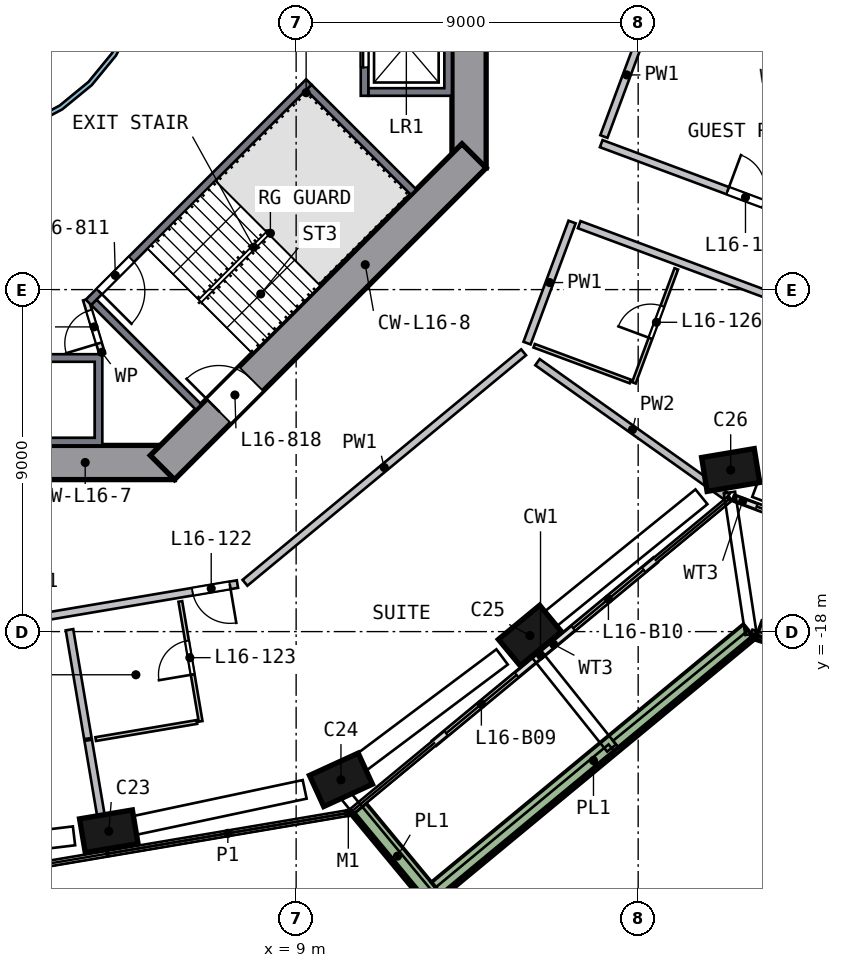
"""IFC4 building model, lengths in metres.
Left out: names, types, materials, properties, quantities, classifications, styles, units other than length and angle.
Written with IfcOpenShell. Run it as: python <this file> out.ifc"""

import sys

from ifc_helpers import new_model, si_unit, direction, frame, frame_2d, origin, origin_2d, place, context, subcontext, project, spatial, polyline, rectangle, outline, extrude, element, fill, save


model = new_model("IFC4")
c1 = context("Model", 3, precision=1e-05, world=origin(), true_north=direction((0.0, 1.0)))
c2 = subcontext(c1, "Body", "Model", "MODEL_VIEW")
j1 = project(units=[si_unit("LENGTHUNIT", "METRE"), si_unit("PLANEANGLEUNIT", "RADIAN")], contexts=[c1])
p1 = place(None, origin())
s1 = spatial("IfcSite", under=j1, at=p1, CompositionType="ELEMENT")
p2 = place(p1, origin())
s2 = spatial("IfcBuilding", under=s1, at=p2, CompositionType="ELEMENT")
p3 = place(p2, frame((0.0, 0.0, 71.5)))
s3 = spatial("IfcBuildingStorey", under=s2, at=p3, CompositionType="ELEMENT", Elevation=71.5)
p4 = place(p3, frame((3.937, -23.278, 0.0), z_axis=(0.110623387, 0.019569342, 0.993669717), x_axis=(0.979911476, 0.164784415, -0.112336973)))
e1 = element("IfcColumn", 1, at=p4, inside=s3, PredefinedType="COLUMN", context=c2, shape_type="SweptSolid", body=[
    extrude(rectangle(XDim=1.4, YDim=0.9, at=origin_2d()), origin(), (0.0, 0.0, 1.0), 3.019),
])
p5 = place(p3, frame((10.054, -21.959, 0.0), z_axis=(0.104043119, 0.048666634, 0.993381391), x_axis=(-0.903351173, -0.413236233, 0.114858494)))
e2 = element("IfcColumn", 2, at=p5, inside=s3, PredefinedType="COLUMN", context=c2, shape_type="SweptSolid", body=[
    extrude(rectangle(XDim=1.4, YDim=0.9, at=origin_2d()), origin(), (0.0, 0.0, 1.0), 3.02),
])
p6 = place(p3, frame((15.049, -18.19, 0.0), z_axis=(0.085879498, 0.072294041, 0.993679165), x_axis=(0.765590624, 0.633458898, -0.112253377)))
e3 = element("IfcColumn", 3, at=p6, inside=s3, PredefinedType="COLUMN", context=c2, shape_type="SweptSolid", body=[
    extrude(rectangle(XDim=1.4, YDim=0.9, at=origin_2d()), origin(), (0.0, 0.0, 1.0), 3.019),
])
p7 = place(p3, frame((20.356, -13.865, 0.0), z_axis=(0.065060711, 0.097308193, 0.99312548), x_axis=(-0.983911636, -0.159691124, 0.080103921)))
e4 = element("IfcColumn", 4, at=p7, inside=s3, PredefinedType="COLUMN", context=c2, shape_type="SweptSolid", body=[
    extrude(rectangle(XDim=1.4, YDim=0.9, at=origin_2d()), origin(), (0.0, 0.0, 1.0), 3.021),
])
p8 = place(p3, frame((13.55, -5.799, 0.0), z_axis=(0.0, 0.0, 1.0), x_axis=(0.0, 1.0, 0.0)))
e5 = element("IfcWall", 5, at=p8, inside=s3, PredefinedType="SHEAR", context=c2, shape_type="SweptSolid", body=[
    extrude(rectangle(XDim=11.598, YDim=0.9, at=frame_2d((5.799, 0.0))), origin(), (0.0, 0.0, 1.0), 3.5),
])
p9 = place(p8, frame((4.899, 0.0, 0.0)))
e6 = element("IfcOpeningElement", 6, at=p9, cuts=e5, PredefinedType="OPENING", context=c2, shape_type="SweptSolid", body=[
    extrude(rectangle(XDim=1.8, YDim=2.1, at=frame_2d((0.9, 1.05))), frame((0.0, 0.46, 0.0), z_axis=(0.0, -1.0, 0.0), x_axis=(1.0, 0.0, 0.0)), (0.0, 0.0, 1.0), 0.92),
])
p10 = place(p3, frame((-5.799, -13.55, 0.0), z_axis=(0.0, 0.0, 1.0), x_axis=(1.0, 0.0, 0.0)))
e7 = element("IfcWall", 7, at=p10, inside=s3, PredefinedType="SHEAR", context=c2, shape_type="SweptSolid", body=[
    extrude(rectangle(XDim=11.598, YDim=0.9, at=frame_2d((5.799, 0.0))), origin(), (0.0, 0.0, 1.0), 3.5),
])
p11 = place(p10, frame((4.899, 0.0, 0.0)))
e8 = element("IfcOpeningElement", 8, at=p11, cuts=e7, PredefinedType="OPENING", context=c2, shape_type="SweptSolid", body=[
    extrude(rectangle(XDim=1.8, YDim=2.1, at=frame_2d((0.9, 1.05))), frame((0.0, 0.46, 0.0), z_axis=(0.0, -1.0, 0.0), x_axis=(1.0, 0.0, 0.0)), (0.0, 0.0, 1.0), 0.92),
])
p12 = place(p3, frame((5.481, -13.682, 0.0), z_axis=(0.0, 0.0, 1.0), x_axis=(0.707106781, 0.707106781, 0.0)))
e9 = element("IfcWall", 9, at=p12, inside=s3, PredefinedType="SHEAR", context=c2, shape_type="SweptSolid", body=[
    extrude(rectangle(XDim=11.598, YDim=0.9, at=frame_2d((5.799, 0.0))), origin(), (0.0, 0.0, 1.0), 3.5),
])
p13 = place(p12, frame((2.099, 0.0, 0.0)))
e10 = element("IfcOpeningElement", 10, at=p13, cuts=e9, PredefinedType="OPENING", context=c2, shape_type="SweptSolid", body=[
    extrude(rectangle(XDim=1.2, YDim=2.1, at=frame_2d((0.6, 1.05))), frame((0.0, 0.46, 0.0), z_axis=(0.0, -1.0, 0.0), x_axis=(1.0, 0.0, 0.0)), (0.0, 0.0, 1.0), 0.92),
])
p14 = place(p3, frame((12.641, -20.928, 0.0), z_axis=(0.0, 0.0, 1.0), x_axis=(0.770528692, 0.637405314, 0.0)))
e11 = element("IfcWall", 11, at=p14, inside=s3, PredefinedType="SOLIDWALL", context=c2, shape_type="SweptSolid", body=[
    extrude(rectangle(XDim=3.6, YDim=0.15, at=frame_2d((1.8, 0.0))), origin(), (0.0, 0.0, 1.0), 2.935),
])
p15 = place(p14, frame((0.4, 0.0, 0.0)))
e12 = element("IfcOpeningElement", 12, at=p15, cuts=e11, PredefinedType="OPENING", context=c2, shape_type="SweptSolid", body=[
    extrude(rectangle(XDim=2.4, YDim=2.4, at=frame_2d((1.2, 1.2))), frame((0.0, 0.085, 0.0), z_axis=(0.0, -1.0, 0.0), x_axis=(1.0, 0.0, 0.0)), (0.0, 0.0, 1.0), 0.17),
])
p16 = place(p3, frame((15.415, -18.634, 0.0), z_axis=(0.0, 0.0, 1.0), x_axis=(0.770532872, 0.637400262, 0.0)))
e13 = element("IfcWall", 13, at=p16, inside=s3, PredefinedType="SOLIDWALL", context=c2, shape_type="SweptSolid", body=[
    extrude(rectangle(XDim=3.939, YDim=0.15, at=frame_2d((1.969, 0.0))), origin(), (0.0, 0.0, 1.0), 2.935),
])
p17 = place(p16, frame((1.139, 0.0, 0.0)))
e14 = element("IfcOpeningElement", 14, at=p17, cuts=e13, PredefinedType="OPENING", context=c2, shape_type="SweptSolid", body=[
    extrude(rectangle(XDim=2.4, YDim=2.4, at=frame_2d((1.2, 1.2))), frame((0.0, 0.085, 0.0), z_axis=(0.0, -1.0, 0.0), x_axis=(1.0, 0.0, 0.0)), (0.0, 0.0, 1.0), 0.17),
])
p18 = place(p3, frame((20.563, -14.502, 0.0), z_axis=(0.0, 0.0, 1.0), x_axis=(0.937270154, -0.348603871, 0.0)))
e15 = element("IfcWall", 15, at=p18, inside=s3, PredefinedType="SOLIDWALL", context=c2, shape_type="SweptSolid", body=[
    extrude(rectangle(XDim=2.497, YDim=0.15, at=frame_2d((1.249, 0.0))), origin(), (0.0, 0.0, 1.0), 2.935),
])
p19 = place(p18, frame((0.597, 0.0, 0.0)))
e16 = element("IfcOpeningElement", 16, at=p19, cuts=e15, PredefinedType="OPENING", context=c2, shape_type="SweptSolid", body=[
    extrude(rectangle(XDim=1.5, YDim=2.4, at=frame_2d((0.75, 1.2))), frame((0.0, 0.085, 0.0), z_axis=(0.0, -1.0, 0.0), x_axis=(1.0, 0.0, 0.0)), (0.0, 0.0, 1.0), 0.17),
])
p20 = place(p3, frame((10.648, -22.676, 0.0), z_axis=(0.0, 0.0, 1.0), x_axis=(0.637463064, -0.770480916, 0.0)))
e17 = element("IfcWall", 17, at=p20, inside=s3, PredefinedType="SOLIDWALL", context=c2, shape_type="SweptSolid", body=[
    extrude(rectangle(XDim=3.199, YDim=0.5, at=frame_2d((1.6, 0.0))), origin(), (0.0, 0.0, 1.0), 0.7),
])
p21 = place(p3, frame((12.72, -24.789, 0.0), z_axis=(0.0, 0.0, 1.0), x_axis=(0.770513868, 0.637423234, 0.0)))
e18 = element("IfcWall", 18, at=p21, inside=s3, PredefinedType="SOLIDWALL", context=c2, shape_type="SweptSolid", body=[
    extrude(rectangle(XDim=10.652, YDim=0.5, at=frame_2d((5.326, 0.0))), origin(), (0.0, 0.0, 1.0), 0.7),
])
p22 = place(p3, frame((21.175, -17.957, 0.0), z_axis=(0.0, 0.0, 1.0), x_axis=(0.937276934, -0.348585642, 0.0)))
e19 = element("IfcWall", 19, at=p22, inside=s3, PredefinedType="SOLIDWALL", context=c2, shape_type="SweptSolid", body=[
    extrude(rectangle(XDim=6.972, YDim=0.5, at=frame_2d((3.486, 0.0))), origin(), (0.0, 0.0, 1.0), 0.7),
])
p23 = place(p3, origin())
e20 = element("IfcWall", 20, at=p23, inside=s3, PredefinedType="SOLIDWALL", context=c2, shape_type="SweptSolid", body=[
    extrude(outline(polyline([(13.1, -3.9), (10.9, -3.9), (10.9, -3.7), (12.9, -3.7), (12.9, -1.4), (10.9, -1.4), (10.9, -1.2), (13.1, -1.2), (13.1, -3.9)])), origin(), (0.0, 0.0, 1.0), 3.0),
])
p24 = place(p3, frame((10.8, -1.2, 0.0), z_axis=(0.0, 0.0, 1.0), x_axis=(0.0, -1.0, 0.0)))
e21 = element("IfcWall", 21, at=p24, inside=s3, PredefinedType="SOLIDWALL", context=c2, shape_type="SweptSolid", body=[
    extrude(rectangle(XDim=2.7, YDim=0.2, at=frame_2d((1.35, 0.0))), origin(), (0.0, 0.0, 1.0), 3.0),
])
p25 = place(p24, frame((0.75, 0.0, 0.0)))
e22 = element("IfcOpeningElement", 22, at=p25, cuts=e21, PredefinedType="OPENING", context=c2, shape_type="SweptSolid", body=[
    extrude(rectangle(XDim=1.2, YDim=2.1, at=frame_2d((0.6, 1.05))), frame((0.0, 0.11, 0.0), z_axis=(0.0, -1.0, 0.0), x_axis=(1.0, 0.0, 0.0)), (0.0, 0.0, 1.0), 0.22),
])
p26 = place(p3, origin())
e23 = element("IfcWall", 23, at=p26, inside=s3, PredefinedType="SOLIDWALL", context=c2, shape_type="SweptSolid", body=[
    extrude(outline(polyline([(3.9, -10.7), (3.9, -13.1), (1.2, -13.1), (1.2, -10.7), (3.9, -10.7)]), holes=[polyline([(1.4, -12.9), (3.7, -12.9), (3.7, -10.9), (1.4, -10.9), (1.4, -12.9)])]), origin(), (0.0, 0.0, 1.0), 3.0),
])
p27 = place(p3, frame((9.334, -3.535, 0.0), z_axis=(0.0, 0.0, 1.0), x_axis=(-0.707106781, -0.707106781, 0.0)))
e24 = element("IfcWall", 24, at=p27, inside=s3, PredefinedType="SOLIDWALL", context=c2, shape_type="SweptSolid", body=[
    extrude(rectangle(XDim=8.2, YDim=0.2, at=frame_2d((4.1, 0.0))), origin(), (0.0, 0.0, 1.0), 3.0),
])
p28 = place(p27, frame((6.6, 0.0, 0.0)))
e25 = element("IfcOpeningElement", 25, at=p28, cuts=e24, PredefinedType="OPENING", context=c2, shape_type="SweptSolid", body=[
    extrude(rectangle(XDim=1.2, YDim=2.1, at=frame_2d((0.6, 1.05))), frame((0.0, 0.11, 0.0), z_axis=(0.0, -1.0, 0.0), x_axis=(1.0, 0.0, 0.0)), (0.0, 0.0, 1.0), 0.22),
])
for number, where, z_axis, x_axis in (
    (26, (3.677, -9.334, 0.0), (0.0, 0.0, 1.0), (0.707, -0.707, 0.0)),
    (27, (9.334, -3.677, 0.0), (0.0, 0.0, 1.0), (0.707, -0.707, 0.0)),
):
    element("IfcWall", number, at=place(p3, frame(where, z_axis=z_axis, x_axis=x_axis)), inside=s3, PredefinedType="SOLIDWALL", context=c2, shape_type="SweptSolid", body=[
        extrude(rectangle(XDim=3.9, YDim=0.2, at=frame_2d((1.95, 0.0))), origin(), (0.0, 0.0, 1.0), 3.0),
    ])
p29 = place(p3, frame((3.9, -10.7, 0.0), z_axis=(0.0, 0.0, 1.0), x_axis=(-0.289808785, 0.957084567, 0.0)))
e28 = element("IfcWall", 28, at=p29, inside=s3, PredefinedType="PARTITIONING", context=c2, shape_type="SweptSolid", body=[
    extrude(rectangle(XDim=1.501, YDim=0.15, at=frame_2d((0.75, 0.0))), origin(), (0.0, 0.0, 1.0), 3.0),
])
p30 = place(p29, frame((0.301, 0.0, 0.0)))
e29 = element("IfcOpeningElement", 29, at=p30, cuts=e28, PredefinedType="OPENING", context=c2, shape_type="SweptSolid", body=[
    extrude(rectangle(XDim=0.9, YDim=2.1, at=frame_2d((0.45, 1.05))), frame((0.0, 0.085, 0.0), z_axis=(0.0, -1.0, 0.0), x_axis=(1.0, 0.0, 0.0)), (0.0, 0.0, 1.0), 0.17),
])
p31 = place(p3, origin())
e30 = element("IfcWall", 30, at=p31, inside=s3, PredefinedType="SOLIDWALL", context=c2, shape_type="SweptSolid", body=[
    extrude(outline(polyline([(5.021, -0.999), (4.73, -1.959), (4.257, -2.844), (3.62, -3.62), (2.844, -4.257), (1.959, -4.73), (0.999, -5.021), (0.0, -5.12), (-0.999, -5.021), (-1.959, -4.73), (-2.844, -4.257), (-3.62, -3.62), (-4.257, -2.844), (-4.73, -1.959), (-5.021, -0.999), (-5.12, 0.0), (-5.021, 0.999), (-4.73, 1.959), (-4.257, 2.844), (-3.62, 3.62), (-2.844, 4.257), (-1.959, 4.73), (-0.999, 5.021), (0.0, 5.12), (0.999, 5.021), (1.959, 4.73), (2.844, 4.257), (3.62, 3.62), (4.257, 2.844), (4.73, 1.959), (5.021, 0.999), (5.12, 0.0), (5.021, -0.999)]), holes=[polyline([(4.904, 0.976), (4.619, 1.913), (4.157, 2.778), (3.535, 3.535), (2.778, 4.157), (1.913, 4.619), (0.976, 4.904), (0.0, 5.0), (-0.976, 4.904), (-1.913, 4.619), (-2.778, 4.157), (-3.535, 3.535), (-4.157, 2.778), (-4.619, 1.913), (-4.904, 0.976), (-5.0, 0.0), (-4.904, -0.976), (-4.619, -1.913), (-4.157, -2.778), (-3.535, -3.535), (-2.778, -4.157), (-1.913, -4.619), (-0.976, -4.904), (0.0, -5.0), (0.976, -4.904), (1.913, -4.619), (2.778, -4.157), (3.535, -3.535), (4.157, -2.778), (4.619, -1.913), (4.904, -0.976), (5.0, 0.0), (4.904, 0.976)])]), origin(), (0.0, 0.0, 1.0), 3.0),
])
p32 = place(p3, frame((7.456, -16.75, 0.0), z_axis=(0.0, 0.0, 1.0), x_axis=(-0.985995117, -0.166774184, 0.0)))
e31 = element("IfcWall", 31, at=p32, inside=s3, PredefinedType="SOLIDWALL", context=c2, shape_type="SweptSolid", body=[
    extrude(rectangle(XDim=9.116, YDim=0.2, at=frame_2d((4.558, 0.0))), origin(), (0.0, 0.0, 1.0), 3.0),
])
p33 = place(p32, frame((0.2, 0.0, 0.0)))
e32 = element("IfcOpeningElement", 32, at=p33, cuts=e31, PredefinedType="OPENING", context=c2, shape_type="SweptSolid", body=[
    extrude(rectangle(XDim=1.0, YDim=2.1, at=frame_2d((0.5, 1.05))), frame((0.0, 0.11, 0.0), z_axis=(0.0, -1.0, 0.0), x_axis=(1.0, 0.0, 0.0)), (0.0, 0.0, 1.0), 0.22),
])
p34 = place(p3, frame((7.654, -16.716, 0.0), z_axis=(0.0, 0.0, 1.0), x_axis=(0.770506418, 0.63743224, 0.0)))
e33 = element("IfcWall", 33, at=p34, inside=s3, PredefinedType="SOLIDWALL", context=c2, shape_type="SweptSolid", body=[
    extrude(rectangle(XDim=9.516, YDim=0.2, at=frame_2d((4.758, 0.0))), origin(), (0.0, 0.0, 1.0), 3.0),
])
p35 = place(p3, frame((15.076, -10.408, 0.0), z_axis=(0.0, 0.0, 1.0), x_axis=(0.348572345, 0.937281879, 0.0)))
e34 = element("IfcWall", 34, at=p35, inside=s3, PredefinedType="SOLIDWALL", context=c2, shape_type="SweptSolid", body=[
    extrude(rectangle(XDim=3.4, YDim=0.2, at=frame_2d((1.7, 0.0))), origin(), (0.0, 0.0, 1.0), 3.0),
])
p36 = place(p3, frame((17.098, -4.972, 0.0), z_axis=(0.0, 0.0, 1.0), x_axis=(0.348592386, 0.937274425, 0.0)))
e35 = element("IfcWall", 35, at=p36, inside=s3, PredefinedType="SOLIDWALL", context=c2, shape_type="SweptSolid", body=[
    extrude(rectangle(XDim=3.458, YDim=0.2, at=frame_2d((1.729, 0.0))), origin(), (0.0, 0.0, 1.0), 3.0),
])
p37 = place(p3, frame((30.62, -12.561, 0.0), z_axis=(0.0, 0.0, 1.0), x_axis=(-0.937284552, 0.348565156, 0.0)))
e36 = element("IfcWall", 36, at=p37, inside=s3, PredefinedType="SOLIDWALL", context=c2, shape_type="SweptSolid", body=[
    extrude(rectangle(XDim=15.12, YDim=0.2, at=frame_2d((7.56, 0.0))), origin(), (0.0, 0.0, 1.0), 3.0),
])
p38 = place(p37, frame((1.7, 0.0, 0.0)))
e37 = element("IfcOpeningElement", 37, at=p38, cuts=e36, PredefinedType="OPENING", context=c2, shape_type="SweptSolid", body=[
    extrude(rectangle(XDim=1.0, YDim=2.1, at=frame_2d((0.5, 1.05))), frame((0.0, 0.11, 0.0), z_axis=(0.0, -1.0, 0.0), x_axis=(1.0, 0.0, 0.0)), (0.0, 0.0, 1.0), 0.22),
])
p39 = place(p3, frame((17.028, -5.159, 0.0), z_axis=(0.0, 0.0, 1.0), x_axis=(0.937277315, -0.348584617, 0.0)))
e38 = element("IfcWall", 38, at=p39, inside=s3, PredefinedType="SOLIDWALL", context=c2, shape_type="SweptSolid", body=[
    extrude(rectangle(XDim=15.12, YDim=0.2, at=frame_2d((7.56, 0.0))), origin(), (0.0, 0.0, 1.0), 3.0),
])
p40 = place(p39, frame((3.55, 0.0, 0.0)))
e39 = element("IfcOpeningElement", 39, at=p40, cuts=e38, PredefinedType="OPENING", context=c2, shape_type="SweptSolid", body=[
    extrude(rectangle(XDim=1.0, YDim=2.1, at=frame_2d((0.5, 1.05))), frame((0.0, 0.11, 0.0), z_axis=(0.0, -1.0, 0.0), x_axis=(1.0, 0.0, 0.0)), (0.0, 0.0, 1.0), 0.22),
])
p41 = place(p3, frame((3.036, -17.951, 0.0), z_axis=(0.0, 0.0, 1.0), x_axis=(0.166756479, -0.985998112, 0.0)))
e40 = element("IfcWall", 40, at=p41, inside=s3, PredefinedType="SOLIDWALL", context=c2, shape_type="SweptSolid", body=[
    extrude(rectangle(XDim=2.905, YDim=0.2, at=frame_2d((1.452, 0.0))), origin(), (0.0, 0.0, 1.0), 3.0),
])
p42 = place(p3, frame((3.528, -20.86, 0.0), z_axis=(0.0, 0.0, 1.0), x_axis=(0.166732133, -0.986002229, 0.0)))
e41 = element("IfcWall", 41, at=p42, inside=s3, PredefinedType="SOLIDWALL", context=c2, shape_type="SweptSolid", body=[
    extrude(rectangle(XDim=2.952, YDim=0.2, at=frame_2d((1.476, 0.0))), origin(), (0.0, 0.0, 1.0), 3.0),
])
p43 = place(p3, frame((15.351, -10.909, 0.0), z_axis=(0.0, 0.0, 1.0), x_axis=(0.815116587, -0.579296944, 0.0)))
e42 = element("IfcWall", 42, at=p43, inside=s3, PredefinedType="SOLIDWALL", context=c2, shape_type="SweptSolid", body=[
    extrude(rectangle(XDim=6.132, YDim=0.2, at=frame_2d((3.066, 0.0))), origin(), (0.0, 0.0, 1.0), 3.0),
])
p44 = place(p3, frame((6.388, -20.378, 0.0), z_axis=(0.0, 0.0, 1.0), x_axis=(-0.986002618, -0.166729833, 0.0)))
e43 = element("IfcWall", 43, at=p44, inside=s3, PredefinedType="PARTITIONING", context=c2, shape_type="SweptSolid", body=[
    extrude(rectangle(XDim=2.7, YDim=0.1, at=frame_2d((1.35, 0.0))), origin(), (0.0, 0.0, 1.0), 3.0),
])
p45 = place(p3, frame((6.487, -20.362, 0.0), z_axis=(0.0, 0.0, 1.0), x_axis=(-0.166773866, 0.985995171, 0.0)))
e44 = element("IfcWall", 44, at=p45, inside=s3, PredefinedType="PARTITIONING", context=c2, shape_type="SweptSolid", body=[
    extrude(rectangle(XDim=3.2, YDim=0.1, at=frame_2d((1.6, 0.0))), origin(), (0.0, 0.0, 1.0), 3.0),
])
p46 = place(p45, frame((1.25, 0.0, 0.0)))
e45 = element("IfcOpeningElement", 45, at=p46, cuts=e44, PredefinedType="OPENING", context=c2, shape_type="SweptSolid", body=[
    extrude(rectangle(XDim=0.9, YDim=2.1, at=frame_2d((0.45, 1.05))), frame((0.0, 0.06, 0.0), z_axis=(0.0, -1.0, 0.0), x_axis=(1.0, 0.0, 0.0)), (0.0, 0.0, 1.0), 0.12),
])
p47 = place(p3, frame((15.263, -10.478, 0.0), z_axis=(0.0, 0.0, 1.0), x_axis=(0.937284378, -0.348565626, 0.0)))
e46 = element("IfcWall", 46, at=p47, inside=s3, PredefinedType="PARTITIONING", context=c2, shape_type="SweptSolid", body=[
    extrude(rectangle(XDim=2.7, YDim=0.1, at=frame_2d((1.35, 0.0))), origin(), (0.0, 0.0, 1.0), 3.0),
])
p48 = place(p3, frame((17.888, -11.454, 0.0), z_axis=(0.0, 0.0, 1.0), x_axis=(0.348630859, 0.937260116, 0.0)))
e47 = element("IfcWall", 47, at=p48, inside=s3, PredefinedType="PARTITIONING", context=c2, shape_type="SweptSolid", body=[
    extrude(rectangle(XDim=3.2, YDim=0.1, at=frame_2d((1.6, 0.0))), origin(), (0.0, 0.0, 1.0), 3.0),
])
p49 = place(p48, frame((1.25, 0.0, 0.0)))
e48 = element("IfcOpeningElement", 48, at=p49, cuts=e47, PredefinedType="OPENING", context=c2, shape_type="SweptSolid", body=[
    extrude(rectangle(XDim=0.9, YDim=2.1, at=frame_2d((0.45, 1.05))), frame((0.0, 0.06, 0.0), z_axis=(0.0, -1.0, 0.0), x_axis=(1.0, 0.0, 0.0)), (0.0, 0.0, 1.0), 0.12),
])
p50 = place(p15, origin())
e49 = element("IfcDoor", 49, at=p50, inside=s3, OperationType="SLIDING_TO_RIGHT", PredefinedType="DOOR", context=c2, shape_type="SweptSolid", body=[
    extrude(rectangle(XDim=2.4, YDim=2.4, at=frame_2d((1.2, 1.2))), frame((0.0, 0.025, 0.0), z_axis=(0.0, -1.0, 0.0), x_axis=(1.0, 0.0, 0.0)), (0.0, 0.0, 1.0), 0.05),
])
fill(e12, e49)
p51 = place(p17, origin())
e50 = element("IfcDoor", 50, at=p51, inside=s3, OperationType="SLIDING_TO_LEFT", PredefinedType="DOOR", context=c2, shape_type="SweptSolid", body=[
    extrude(rectangle(XDim=2.4, YDim=2.4, at=frame_2d((1.2, 1.2))), frame((0.0, 0.025, 0.0), z_axis=(0.0, -1.0, 0.0), x_axis=(1.0, 0.0, 0.0)), (0.0, 0.0, 1.0), 0.05),
])
fill(e14, e50)
p52 = place(p19, origin())
e51 = element("IfcDoor", 51, at=p52, inside=s3, OperationType="SLIDING_TO_LEFT", PredefinedType="DOOR", context=c2, shape_type="SweptSolid", body=[
    extrude(rectangle(XDim=1.5, YDim=2.4, at=frame_2d((0.75, 1.2))), frame((0.0, 0.025, 0.0), z_axis=(0.0, -1.0, 0.0), x_axis=(1.0, 0.0, 0.0)), (0.0, 0.0, 1.0), 0.05),
])
fill(e16, e51)
p53 = place(p25, origin())
e52 = element("IfcDoor", 52, at=p53, inside=s3, OperationType="DOUBLE_DOOR_SLIDING", PredefinedType="DOOR", context=c2, shape_type="SweptSolid", body=[
    extrude(rectangle(XDim=1.2, YDim=2.1, at=frame_2d((0.6, 1.05))), frame((0.0, 0.025, 0.0), z_axis=(0.0, -1.0, 0.0), x_axis=(1.0, 0.0, 0.0)), (0.0, 0.0, 1.0), 0.05),
])
fill(e22, e52)
p54 = place(p28, origin())
e53 = element("IfcDoor", 53, at=p54, inside=s3, OperationType="SINGLE_SWING_RIGHT", PredefinedType="DOOR", context=c2, shape_type="SweptSolid", body=[
    extrude(rectangle(XDim=1.2, YDim=2.1, at=frame_2d((0.6, 1.05))), frame((0.0, 0.025, 0.0), z_axis=(0.0, -1.0, 0.0), x_axis=(1.0, 0.0, 0.0)), (0.0, 0.0, 1.0), 0.05),
])
fill(e25, e53)
p55 = place(p13, origin())
e54 = element("IfcDoor", 54, at=p55, inside=s3, OperationType="SINGLE_SWING_LEFT", PredefinedType="DOOR", context=c2, shape_type="SweptSolid", body=[
    extrude(rectangle(XDim=1.2, YDim=2.1, at=frame_2d((0.6, 1.05))), frame((0.0, 0.025, 0.0), z_axis=(0.0, -1.0, 0.0), x_axis=(1.0, 0.0, 0.0)), (0.0, 0.0, 1.0), 0.05),
])
fill(e10, e54)
p56 = place(p30, origin())
e55 = element("IfcDoor", 55, at=p56, inside=s3, OperationType="SINGLE_SWING_LEFT", PredefinedType="DOOR", context=c2, shape_type="SweptSolid", body=[
    extrude(rectangle(XDim=0.9, YDim=2.1, at=frame_2d((0.45, 1.05))), frame((0.0, 0.025, 0.0), z_axis=(0.0, -1.0, 0.0), x_axis=(1.0, 0.0, 0.0)), (0.0, 0.0, 1.0), 0.05),
])
fill(e29, e55)
p57 = place(p33, origin())
e56 = element("IfcDoor", 56, at=p57, inside=s3, OperationType="SINGLE_SWING_LEFT", PredefinedType="DOOR", context=c2, shape_type="SweptSolid", body=[
    extrude(rectangle(XDim=1.0, YDim=2.1, at=frame_2d((0.5, 1.05))), frame((0.0, 0.025, 0.0), z_axis=(0.0, -1.0, 0.0), x_axis=(1.0, 0.0, 0.0)), (0.0, 0.0, 1.0), 0.05),
])
fill(e32, e56)
p58 = place(p46, origin())
e57 = element("IfcDoor", 57, at=p58, inside=s3, OperationType="SINGLE_SWING_LEFT", PredefinedType="DOOR", context=c2, shape_type="SweptSolid", body=[
    extrude(rectangle(XDim=0.9, YDim=2.1, at=frame_2d((0.45, 1.05))), frame((0.0, 0.025, 0.0), z_axis=(0.0, -1.0, 0.0), x_axis=(1.0, 0.0, 0.0)), (0.0, 0.0, 1.0), 0.05),
])
fill(e45, e57)
p59 = place(p49, origin())
e58 = element("IfcDoor", 58, at=p59, inside=s3, OperationType="SINGLE_SWING_LEFT", PredefinedType="DOOR", context=c2, shape_type="SweptSolid", body=[
    extrude(rectangle(XDim=0.9, YDim=2.1, at=frame_2d((0.45, 1.05))), frame((0.0, 0.025, 0.0), z_axis=(0.0, -1.0, 0.0), x_axis=(1.0, 0.0, 0.0)), (0.0, 0.0, 1.0), 0.05),
])
fill(e48, e58)
p60 = place(p40, origin())
e59 = element("IfcDoor", 59, at=p60, inside=s3, OperationType="SINGLE_SWING_LEFT", PredefinedType="DOOR", context=c2, shape_type="SweptSolid", body=[
    extrude(rectangle(XDim=1.0, YDim=2.1, at=frame_2d((0.5, 1.05))), frame((0.0, 0.025, 0.0), z_axis=(0.0, -1.0, 0.0), x_axis=(1.0, 0.0, 0.0)), (0.0, 0.0, 1.0), 0.05),
])
fill(e39, e59)
save(model, sys.argv[1])
